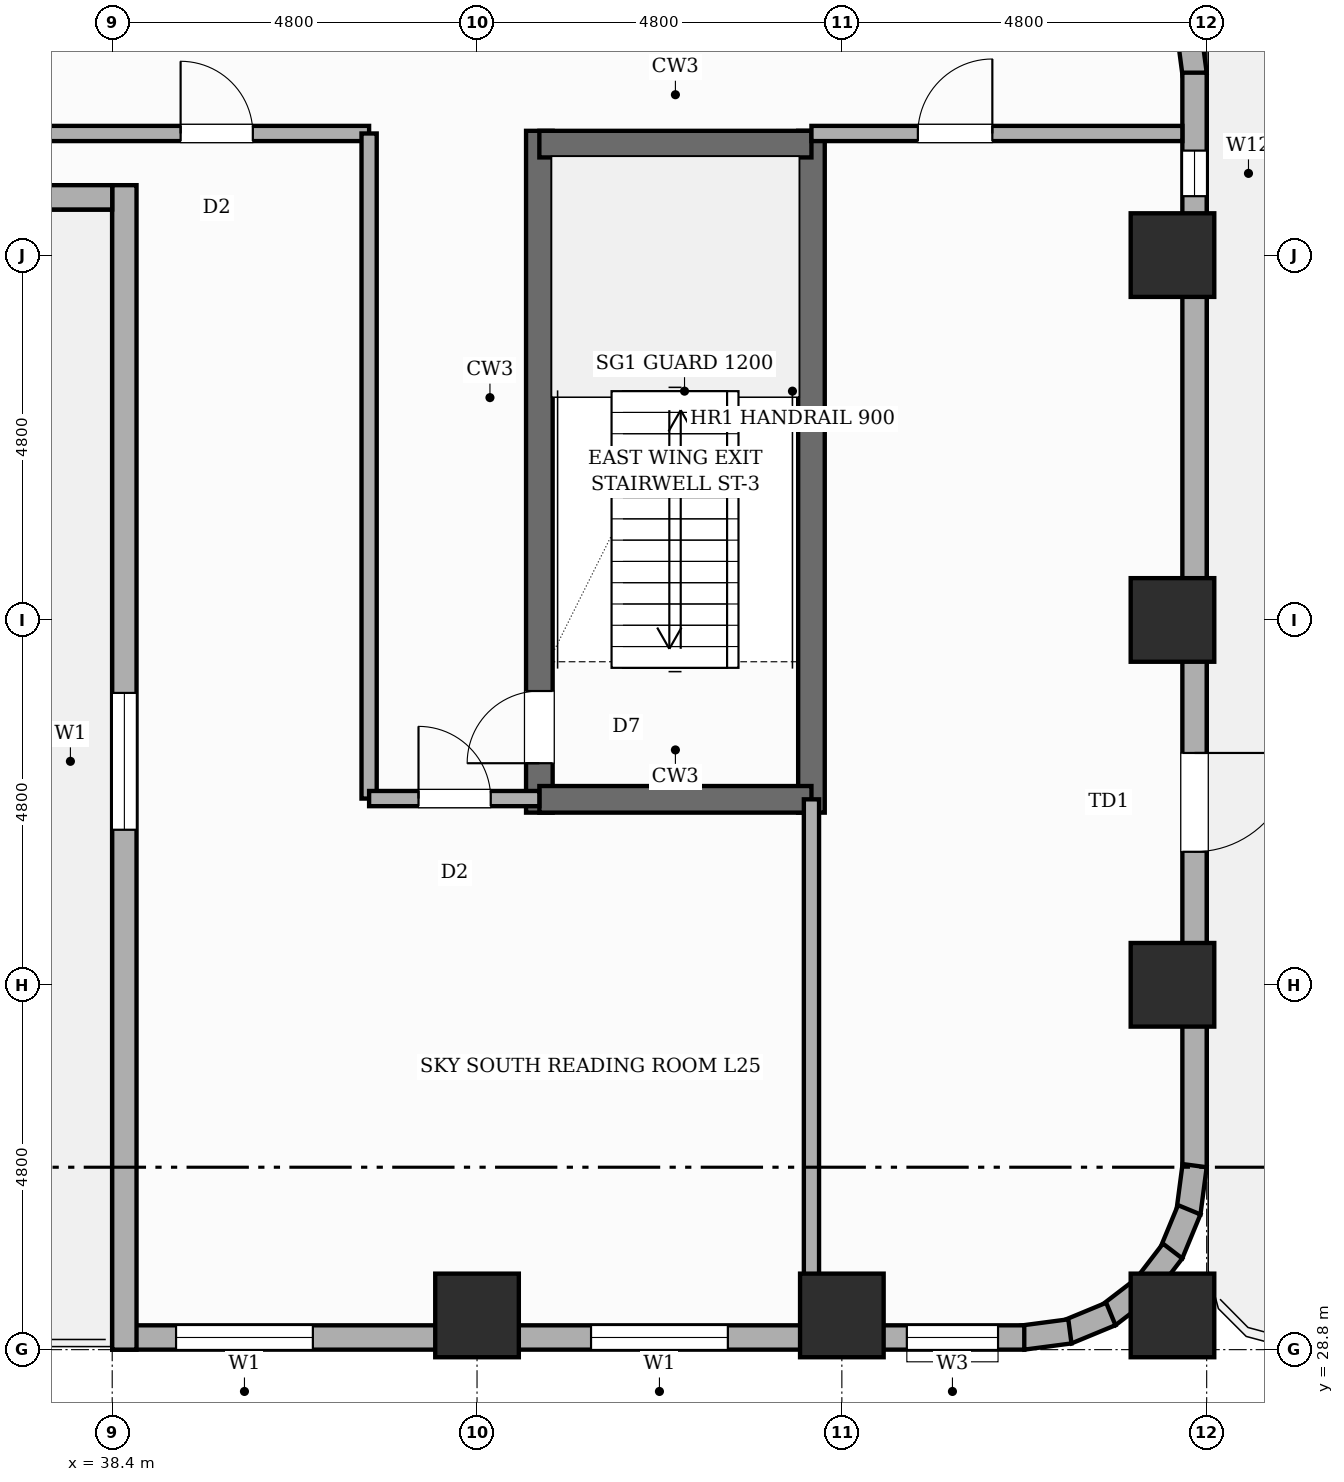
"""IFC4 building model, lengths in metres.
Left out: names, types, materials, properties, quantities, classifications, styles, units other than length and angle.
Written with IfcOpenShell. Run it as: python <this file> out.ifc"""

import sys

from ifc_helpers import new_model, si_unit, direction, frame, frame_2d, origin, origin_2d, place, context, subcontext, project, spatial, rectangle, extrude, element, fill, save


model = new_model("IFC4")
c1 = context("Model", 3, precision=1e-05, world=origin(), true_north=direction((0.0, 1.0)))
c2 = subcontext(c1, "Body", "Model", "MODEL_VIEW")
j1 = project(units=[si_unit("LENGTHUNIT", "METRE"), si_unit("PLANEANGLEUNIT", "RADIAN")], contexts=[c1])
p1 = place(None, origin())
s1 = spatial("IfcSite", under=j1, at=p1, CompositionType="ELEMENT")
p2 = place(p1, origin())
s2 = spatial("IfcBuilding", under=s1, at=p2, CompositionType="ELEMENT")
p3 = place(p2, frame((0.0, 0.0, 97.0)))
s3 = spatial("IfcBuildingStorey", under=s2, at=p3, CompositionType="ELEMENT", Elevation=97.0)
p4 = place(p3, frame((44.02, 35.865, 0.0), z_axis=(0.0, 0.0, 1.0), x_axis=(0.0, 1.0, 0.0)))
e1 = element("IfcWall", 1, at=p4, inside=s3, PredefinedType="SHEAR", context=c2, shape_type="SweptSolid", body=[
    extrude(rectangle(XDim=8.97, YDim=0.35, at=frame_2d((4.485, 0.0))), origin(), (0.0, 0.0, 1.0), 4.8),
])
p5 = place(p4, frame((0.65, 0.0, 0.0)))
e2 = element("IfcOpeningElement", 2, at=p5, cuts=e1, PredefinedType="OPENING", context=c2, shape_type="SweptSolid", body=[
    extrude(rectangle(XDim=0.95, YDim=2.1, at=frame_2d((0.475, 1.05))), frame((0.0, 0.185, 0.0), z_axis=(0.0, -1.0, 0.0), x_axis=(1.0, 0.0, 0.0)), (0.0, 0.0, 1.0), 0.37),
])
p6 = place(p3, frame((47.6, 35.865, 0.0), z_axis=(0.0, 0.0, 1.0), x_axis=(0.0, 1.0, 0.0)))
e3 = element("IfcWall", 3, at=p6, inside=s3, PredefinedType="SHEAR", context=c2, shape_type="SweptSolid", body=[
    extrude(rectangle(XDim=8.97, YDim=0.35, at=frame_2d((4.485, 0.0))), origin(), (0.0, 0.0, 1.0), 4.8),
])
for number, where, z_axis, x_axis in (
    (4, (44.02, 36.04, 0.0), (0.0, 0.0, 1.0), (1.0, 0.0, 0.0)),
    (5, (44.02, 44.66, 0.0), (0.0, 0.0, 1.0), (1.0, 0.0, 0.0)),
):
    element("IfcWall", number, at=place(p3, frame(where, z_axis=z_axis, x_axis=x_axis)), inside=s3, PredefinedType="SHEAR", context=c2, shape_type="SweptSolid", body=[
        extrude(rectangle(XDim=3.58, YDim=0.35, at=frame_2d((1.79, 0.0))), origin(), (0.0, 0.0, 1.0), 4.8),
    ])
for number, where, z_axis, x_axis in (
    (6, (43.2, 29.25, 0.0), (0.0, 0.0, 1.0), (1.0, 0.0, 0.0)),
    (7, (48.0, 29.25, 0.0), (0.0, 0.0, 1.0), (1.0, 0.0, 0.0)),
    (8, (52.35, 29.25, 0.0), (0.0, 0.0, 1.0), (1.0, 0.0, 0.0)),
    (9, (52.35, 33.6, 0.0), (0.0, 0.0, 1.0), (1.0, 0.0, 0.0)),
    (10, (52.35, 38.4, 0.0), (0.0, 0.0, 1.0), (1.0, 0.0, 0.0)),
    (11, (52.35, 43.2, 0.0), (0.0, 0.0, 1.0), (1.0, 0.0, 0.0)),
):
    element("IfcColumn", number, at=place(p3, frame(where, z_axis=z_axis, x_axis=x_axis)), inside=s3, PredefinedType="COLUMN", context=c2, shape_type="SweptSolid", body=[
        extrude(rectangle(XDim=1.1, YDim=1.1, at=origin_2d()), origin(), (0.0, 0.0, 1.0), 4.8),
    ])
p7 = place(p3, frame((52.56, 46.2, 0.0), z_axis=(0.0, 0.0, 1.0), x_axis=(0.130555323746, -0.9914410257, 0.0)))
e12 = element("IfcWall", 12, at=p7, inside=s3, PredefinedType="STANDARD", context=c2, shape_type="SweptSolid", body=[
    extrude(rectangle(XDim=0.626, YDim=0.32, at=frame_2d((0.313, 0.0))), origin(), (0.0, 0.0, 1.0), 3.68),
])
p8 = place(p3, frame((52.64, 45.6, 0.0), z_axis=(0.0, 0.0, 1.0), x_axis=(0.0, -1.0, 0.0)))
e13 = element("IfcWall", 13, at=p8, inside=s3, PredefinedType="STANDARD", context=c2, shape_type="SweptSolid", body=[
    extrude(rectangle(XDim=14.4, YDim=0.32, at=frame_2d((7.2, 0.0))), origin(), (0.0, 0.0, 1.0), 3.68),
])
p9 = place(p8, frame((8.95, 0.0, 0.0)))
e14 = element("IfcOpeningElement", 14, at=p9, cuts=e13, PredefinedType="OPENING", context=c2, shape_type="SweptSolid", body=[
    extrude(rectangle(XDim=1.3, YDim=2.2, at=frame_2d((0.65, 1.1))), frame((0.0, 0.17, 0.0), z_axis=(0.0, -1.0, 0.0), x_axis=(1.0, 0.0, 0.0)), (0.0, 0.0, 1.0), 0.34),
])
p10 = place(p8, frame((1.025, 0.0, 0.45)))
e15 = element("IfcOpeningElement", 15, at=p10, cuts=e13, PredefinedType="OPENING", context=c2, shape_type="SweptSolid", body=[
    extrude(rectangle(XDim=0.6, YDim=1.8, at=frame_2d((0.3, 0.9))), frame((0.0, 0.17, 0.0), z_axis=(0.0, -1.0, 0.0), x_axis=(1.0, 0.0, 0.0)), (0.0, 0.0, 1.0), 0.34),
])
p11 = place(p3, frame((52.641, 31.221, 0.0), z_axis=(0.0, 0.0, 1.0), x_axis=(-0.130504898859, -0.991447664465, 0.0)))
e16 = element("IfcWall", 16, at=p11, inside=s3, PredefinedType="STANDARD", context=c2, shape_type="SweptSolid", body=[
    extrude(rectangle(XDim=0.627, YDim=0.32, at=frame_2d((0.313, 0.0))), origin(), (0.0, 0.0, 1.0), 3.68),
])
p12 = place(p3, frame((52.57, 30.64, 0.0), z_axis=(0.0, 0.0, 1.0), x_axis=(-0.382455093999, -0.923974080304, 0.0)))
e17 = element("IfcWall", 17, at=p12, inside=s3, PredefinedType="STANDARD", context=c2, shape_type="SweptSolid", body=[
    extrude(rectangle(XDim=0.626, YDim=0.32, at=frame_2d((0.313, 0.0))), origin(), (0.0, 0.0, 1.0), 3.68),
])
p13 = place(p3, frame((52.352, 30.097, 0.0), z_axis=(0.0, 0.0, 1.0), x_axis=(-0.608693302629, -0.793405610854, 0.0)))
e18 = element("IfcWall", 18, at=p13, inside=s3, PredefinedType="STANDARD", context=c2, shape_type="SweptSolid", body=[
    extrude(rectangle(XDim=0.626, YDim=0.32, at=frame_2d((0.313, 0.0))), origin(), (0.0, 0.0, 1.0), 3.68),
])
p14 = place(p3, frame((52.0, 29.63, 0.0), z_axis=(0.0, 0.0, 1.0), x_axis=(-0.7932174212, -0.608938521285, 0.0)))
e19 = element("IfcWall", 19, at=p14, inside=s3, PredefinedType="STANDARD", context=c2, shape_type="SweptSolid", body=[
    extrude(rectangle(XDim=0.627, YDim=0.32, at=frame_2d((0.313, 0.0))), origin(), (0.0, 0.0, 1.0), 3.68),
])
for number, where, z_axis, x_axis in (
    (20, (51.539, 29.269, 0.0), (0.0, 0.0, 1.0), (-0.924, -0.383, 0.0)),
    (21, (51.0, 29.04, 0.0), (0.0, 0.0, 1.0), (-0.991, -0.131, 0.0)),
):
    element("IfcWall", number, at=place(p3, frame(where, z_axis=z_axis, x_axis=x_axis)), inside=s3, PredefinedType="STANDARD", context=c2, shape_type="SweptSolid", body=[
        extrude(rectangle(XDim=0.626, YDim=0.32, at=frame_2d((0.313, 0.0))), origin(), (0.0, 0.0, 1.0), 3.68),
    ])
p15 = place(p3, frame((50.4, 28.96, 0.0), z_axis=(0.0, 0.0, 1.0), x_axis=(-1.0, 0.0, 0.0)))
e22 = element("IfcWall", 22, at=p15, inside=s3, PredefinedType="STANDARD", context=c2, shape_type="SweptSolid", body=[
    extrude(rectangle(XDim=12.0, YDim=0.32, at=frame_2d((6.0, 0.0))), origin(), (0.0, 0.0, 1.0), 3.68),
])
p16 = place(p15, frame((9.36, 0.0, 0.8)))
e23 = element("IfcOpeningElement", 23, at=p16, cuts=e22, PredefinedType="OPENING", context=c2, shape_type="SweptSolid", body=[
    extrude(rectangle(XDim=1.8, YDim=2.1, at=frame_2d((0.9, 1.05))), frame((0.0, 0.17, 0.0), z_axis=(0.0, -1.0, 0.0), x_axis=(1.0, 0.0, 0.0)), (0.0, 0.0, 1.0), 0.34),
])
p17 = place(p15, frame((0.345, 0.0, 0.8)))
e24 = element("IfcOpeningElement", 24, at=p17, cuts=e22, PredefinedType="OPENING", context=c2, shape_type="SweptSolid", body=[
    extrude(rectangle(XDim=1.2, YDim=1.8, at=frame_2d((0.6, 0.9))), frame((0.0, 0.17, 0.0), z_axis=(0.0, -1.0, 0.0), x_axis=(1.0, 0.0, 0.0)), (0.0, 0.0, 1.0), 0.34),
])
p18 = place(p15, frame((3.9, 0.0, 0.8)))
e25 = element("IfcOpeningElement", 25, at=p18, cuts=e22, PredefinedType="OPENING", context=c2, shape_type="SweptSolid", body=[
    extrude(rectangle(XDim=1.8, YDim=2.1, at=frame_2d((0.9, 1.05))), frame((0.0, 0.17, 0.0), z_axis=(0.0, -1.0, 0.0), x_axis=(1.0, 0.0, 0.0)), (0.0, 0.0, 1.0), 0.34),
])
p19 = place(p3, frame((38.56, 28.8, 0.0), z_axis=(0.0, 0.0, 1.0), x_axis=(0.0, 1.0, 0.0)))
e26 = element("IfcWall", 26, at=p19, inside=s3, PredefinedType="STANDARD", context=c2, shape_type="SweptSolid", body=[
    extrude(rectangle(XDim=15.32, YDim=0.32, at=frame_2d((7.66, 0.0))), origin(), (0.0, 0.0, 1.0), 4.5),
])
p20 = place(p19, frame((6.84, 0.0, 0.8)))
e27 = element("IfcOpeningElement", 27, at=p20, cuts=e26, PredefinedType="OPENING", context=c2, shape_type="SweptSolid", body=[
    extrude(rectangle(XDim=1.8, YDim=2.1, at=frame_2d((0.9, 1.05))), frame((0.0, 0.17, 0.0), z_axis=(0.0, -1.0, 0.0), x_axis=(1.0, 0.0, 0.0)), (0.0, 0.0, 1.0), 0.34),
])
p21 = place(p3, frame((38.4, 43.96, 0.0), z_axis=(0.0, 0.0, 1.0), x_axis=(-1.0, 0.0, 0.0)))
e28 = element("IfcWall", 28, at=p21, inside=s3, PredefinedType="STANDARD", context=c2, shape_type="SweptSolid", body=[
    extrude(rectangle(XDim=1.24, YDim=0.32, at=frame_2d((0.62, 0.0))), origin(), (0.0, 0.0, 1.0), 4.5),
])
p22 = place(p3, frame((24.75, 44.8, 0.0), z_axis=(0.0, 0.0, 1.0), x_axis=(1.0, 0.0, 0.0)))
e29 = element("IfcWall", 29, at=p22, inside=s3, PredefinedType="PARTITIONING", context=c2, shape_type="SweptSolid", body=[
    extrude(rectangle(XDim=17.03, YDim=0.2, at=frame_2d((8.515, 0.0))), origin(), (0.0, 0.0, 1.0), 4.5),
])
p23 = place(p22, frame((14.55, 0.0, 0.0)))
e30 = element("IfcOpeningElement", 30, at=p23, cuts=e29, PredefinedType="OPENING", context=c2, shape_type="SweptSolid", body=[
    extrude(rectangle(XDim=0.95, YDim=2.15, at=frame_2d((0.475, 1.075))), frame((0.0, 0.11, 0.0), z_axis=(0.0, -1.0, 0.0), x_axis=(1.0, 0.0, 0.0)), (0.0, 0.0, 1.0), 0.22),
])
p24 = place(p3, frame((47.6, 44.8, 0.0), z_axis=(0.0, 0.0, 1.0), x_axis=(1.0, 0.0, 0.0)))
e31 = element("IfcWall", 31, at=p24, inside=s3, PredefinedType="PARTITIONING", context=c2, shape_type="SweptSolid", body=[
    extrude(rectangle(XDim=4.88, YDim=0.2, at=frame_2d((2.44, 0.0))), origin(), (0.0, 0.0, 1.0), 4.5),
])
p25 = place(p24, frame((1.4, 0.0, 0.0)))
e32 = element("IfcOpeningElement", 32, at=p25, cuts=e31, PredefinedType="OPENING", context=c2, shape_type="SweptSolid", body=[
    extrude(rectangle(XDim=0.98, YDim=2.18, at=frame_2d((0.49, 1.09))), frame((0.0, 0.11, 0.0), z_axis=(0.0, -1.0, 0.0), x_axis=(1.0, 0.0, 0.0)), (0.0, 0.0, 1.0), 0.22),
])
p26 = place(p3, frame((41.78, 36.05, 0.0), z_axis=(0.0, 0.0, 1.0), x_axis=(0.0, 1.0, 0.0)))
e33 = element("IfcWall", 33, at=p26, inside=s3, PredefinedType="PARTITIONING", context=c2, shape_type="SweptSolid", body=[
    extrude(rectangle(XDim=8.75, YDim=0.2, at=frame_2d((4.375, 0.0))), origin(), (0.0, 0.0, 1.0), 4.5),
])
p27 = place(p3, frame((41.78, 36.05, 0.0), z_axis=(0.0, 0.0, 1.0), x_axis=(1.0, 0.0, 0.0)))
e34 = element("IfcWall", 34, at=p27, inside=s3, PredefinedType="PARTITIONING", context=c2, shape_type="SweptSolid", body=[
    extrude(rectangle(XDim=2.24, YDim=0.2, at=frame_2d((1.12, 0.0))), origin(), (0.0, 0.0, 1.0), 4.5),
])
p28 = place(p27, frame((0.65, 0.0, 0.0)))
e35 = element("IfcOpeningElement", 35, at=p28, cuts=e34, PredefinedType="OPENING", context=c2, shape_type="SweptSolid", body=[
    extrude(rectangle(XDim=0.95, YDim=2.15, at=frame_2d((0.475, 1.075))), frame((0.0, 0.11, 0.0), z_axis=(0.0, -1.0, 0.0), x_axis=(1.0, 0.0, 0.0)), (0.0, 0.0, 1.0), 0.22),
])
p29 = place(p3, frame((47.6, 29.12, 0.0), z_axis=(0.0, 0.0, 1.0), x_axis=(0.0, 1.0, 0.0)))
e36 = element("IfcWall", 36, at=p29, inside=s3, PredefinedType="SOLIDWALL", context=c2, shape_type="SweptSolid", body=[
    extrude(rectangle(XDim=6.92, YDim=0.2, at=frame_2d((3.46, 0.0))), origin(), (0.0, 0.0, 1.0), 4.5),
])
p30 = place(p9, origin())
e37 = element("IfcDoor", 37, at=p30, inside=s3, OperationType="SINGLE_SWING_LEFT", PredefinedType="DOOR", context=c2, shape_type="SweptSolid", body=[
    extrude(rectangle(XDim=1.3, YDim=2.2, at=frame_2d((0.65, 1.1))), frame((0.0, 0.025, 0.0), z_axis=(0.0, -1.0, 0.0), x_axis=(1.0, 0.0, 0.0)), (0.0, 0.0, 1.0), 0.05),
])
fill(e14, e37)
p31 = place(p10, origin())
e38 = element("IfcWindow", 38, at=p31, inside=s3, PartitioningType="SINGLE_PANEL", PredefinedType="WINDOW", context=c2, shape_type="SweptSolid", body=[
    extrude(rectangle(XDim=0.6, YDim=1.8, at=frame_2d((0.3, 0.9))), frame((0.0, 0.03, 0.0), z_axis=(0.0, -1.0, 0.0), x_axis=(1.0, 0.0, 0.0)), (0.0, 0.0, 1.0), 0.06),
])
fill(e15, e38)
p32 = place(p16, origin())
e39 = element("IfcWindow", 39, at=p32, inside=s3, PartitioningType="SINGLE_PANEL", PredefinedType="WINDOW", context=c2, shape_type="SweptSolid", body=[
    extrude(rectangle(XDim=1.8, YDim=2.1, at=frame_2d((0.9, 1.05))), frame((0.0, 0.03, 0.0), z_axis=(0.0, -1.0, 0.0), x_axis=(1.0, 0.0, 0.0)), (0.0, 0.0, 1.0), 0.06),
])
fill(e23, e39)
p33 = place(p17, origin())
e40 = element("IfcWindow", 40, at=p33, inside=s3, PartitioningType="SINGLE_PANEL", PredefinedType="WINDOW", context=c2, shape_type="SweptSolid", body=[
    extrude(rectangle(XDim=1.2, YDim=1.8, at=frame_2d((0.6, 0.9))), frame((0.0, 0.03, 0.0), z_axis=(0.0, -1.0, 0.0), x_axis=(1.0, 0.0, 0.0)), (0.0, 0.0, 1.0), 0.06),
])
fill(e24, e40)
p34 = place(p18, origin())
e41 = element("IfcWindow", 41, at=p34, inside=s3, PartitioningType="SINGLE_PANEL", PredefinedType="WINDOW", context=c2, shape_type="SweptSolid", body=[
    extrude(rectangle(XDim=1.8, YDim=2.1, at=frame_2d((0.9, 1.05))), frame((0.0, 0.03, 0.0), z_axis=(0.0, -1.0, 0.0), x_axis=(1.0, 0.0, 0.0)), (0.0, 0.0, 1.0), 0.06),
])
fill(e25, e41)
p35 = place(p20, origin())
e42 = element("IfcWindow", 42, at=p35, inside=s3, PartitioningType="SINGLE_PANEL", PredefinedType="WINDOW", context=c2, shape_type="SweptSolid", body=[
    extrude(rectangle(XDim=1.8, YDim=2.1, at=frame_2d((0.9, 1.05))), frame((0.0, 0.03, 0.0), z_axis=(0.0, -1.0, 0.0), x_axis=(1.0, 0.0, 0.0)), (0.0, 0.0, 1.0), 0.06),
])
fill(e27, e42)
p36 = place(p5, origin())
e43 = element("IfcDoor", 43, at=p36, inside=s3, OperationType="SINGLE_SWING_LEFT", PredefinedType="DOOR", context=c2, shape_type="SweptSolid", body=[
    extrude(rectangle(XDim=0.95, YDim=2.1, at=frame_2d((0.475, 1.05))), frame((0.0, 0.025, 0.0), z_axis=(0.0, -1.0, 0.0), x_axis=(1.0, 0.0, 0.0)), (0.0, 0.0, 1.0), 0.05),
])
fill(e2, e43)
p37 = place(p23, origin())
e44 = element("IfcDoor", 44, at=p37, inside=s3, OperationType="SINGLE_SWING_LEFT", PredefinedType="DOOR", context=c2, shape_type="SweptSolid", body=[
    extrude(rectangle(XDim=0.95, YDim=2.15, at=frame_2d((0.475, 1.075))), frame((0.0, 0.025, 0.0), z_axis=(0.0, -1.0, 0.0), x_axis=(1.0, 0.0, 0.0)), (0.0, 0.0, 1.0), 0.05),
])
fill(e30, e44)
p38 = place(p28, origin())
e45 = element("IfcDoor", 45, at=p38, inside=s3, OperationType="SINGLE_SWING_LEFT", PredefinedType="DOOR", context=c2, shape_type="SweptSolid", body=[
    extrude(rectangle(XDim=0.95, YDim=2.15, at=frame_2d((0.475, 1.075))), frame((0.0, 0.025, 0.0), z_axis=(0.0, -1.0, 0.0), x_axis=(1.0, 0.0, 0.0)), (0.0, 0.0, 1.0), 0.05),
])
fill(e35, e45)
p39 = place(p25, origin())
e46 = element("IfcDoor", 46, at=p39, inside=s3, OperationType="SINGLE_SWING_RIGHT", PredefinedType="DOOR", context=c2, shape_type="SweptSolid", body=[
    extrude(rectangle(XDim=0.98, YDim=2.18, at=frame_2d((0.49, 1.09))), frame((0.0, 0.025, 0.0), z_axis=(0.0, -1.0, 0.0), x_axis=(1.0, 0.0, 0.0)), (0.0, 0.0, 1.0), 0.05),
])
fill(e32, e46)
save(model, sys.argv[1])
